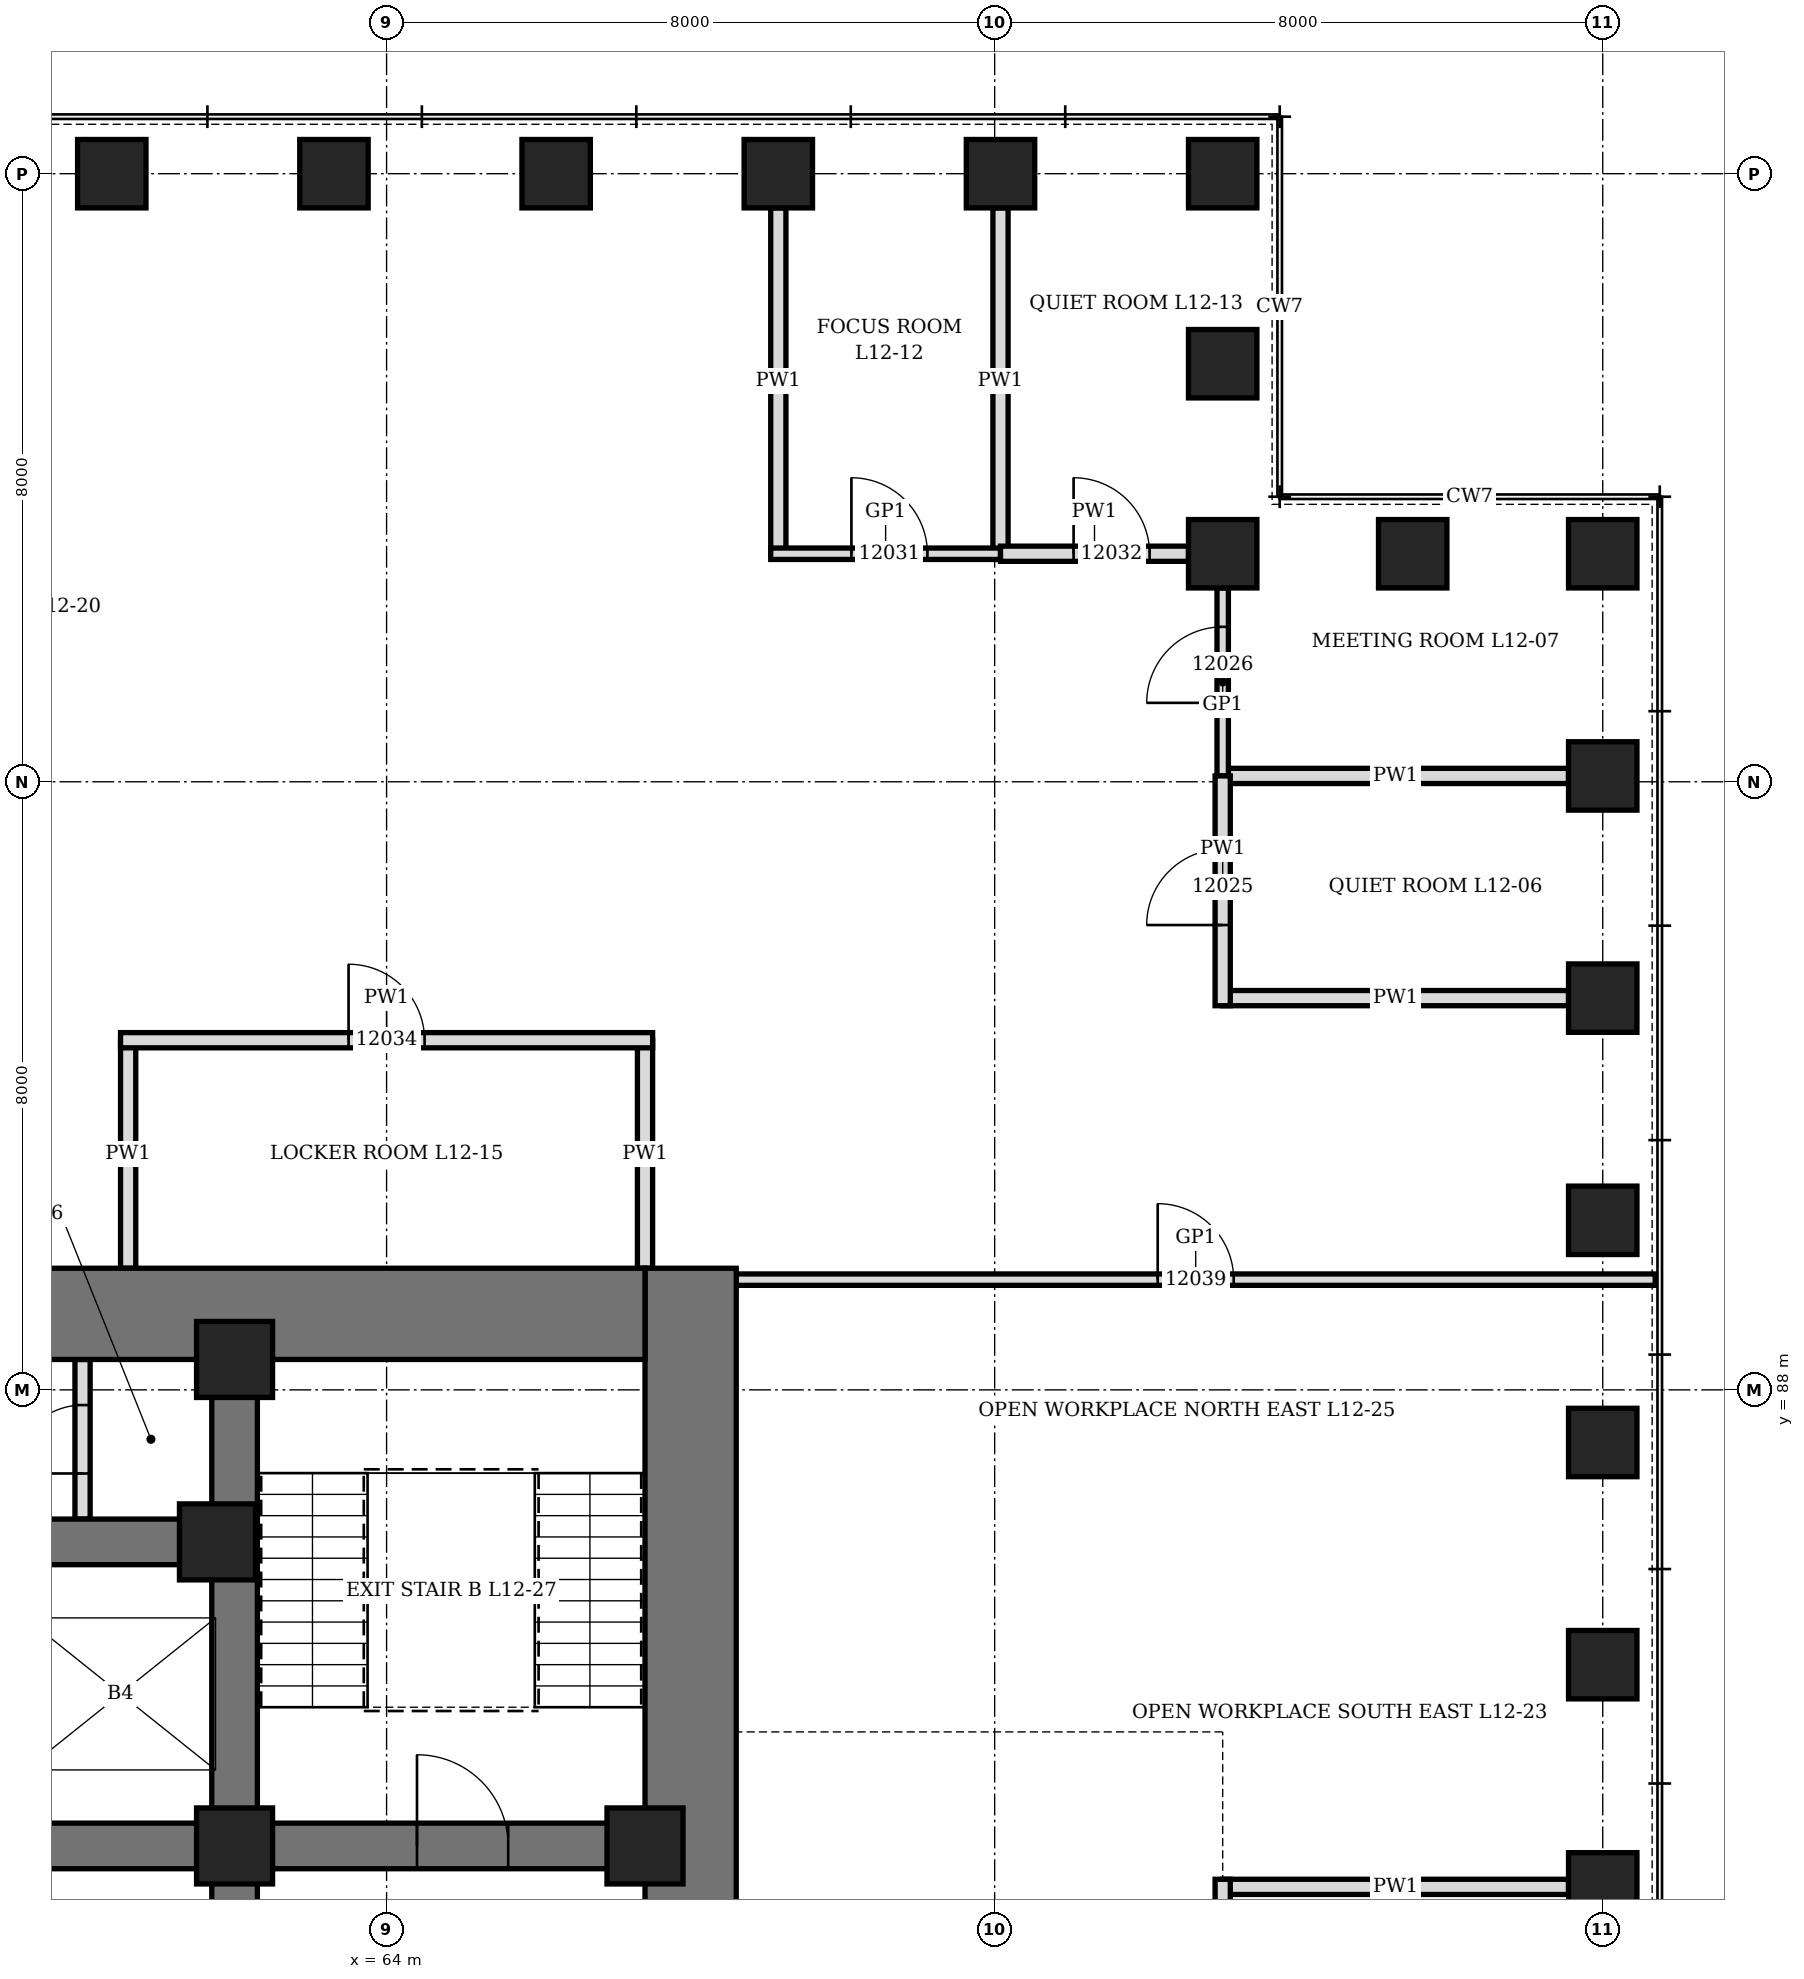
"""IFC4 building model, lengths in metres.
Left out: names, types, materials, properties, quantities, classifications, styles, units other than length and angle.
Written with IfcOpenShell. Run it as: python <this file> out.ifc"""

import sys

from ifc_helpers import new_model, si_unit, direction, frame, frame_2d, origin, origin_2d, place, context, subcontext, project, spatial, rectangle, hollow_rectangle, extrude, element, fill, save


model = new_model("IFC4")
c1 = context("Model", 3, precision=1e-05, world=origin(), true_north=direction((0.0, 1.0)))
c2 = subcontext(c1, "Body", "Model", "MODEL_VIEW")
j1 = project(units=[si_unit("LENGTHUNIT", "METRE"), si_unit("PLANEANGLEUNIT", "RADIAN")], contexts=[c1])
p1 = place(None, origin())
s1 = spatial("IfcSite", under=j1, at=p1, CompositionType="ELEMENT")
p2 = place(p1, origin())
s2 = spatial("IfcBuilding", under=s1, at=p2, CompositionType="ELEMENT")
p3 = place(p2, frame((0.0, 0.0, 60.1)))
s3 = spatial("IfcBuildingStorey", under=s2, at=p3, CompositionType="ELEMENT", Elevation=60.1)
for number, where, z_axis, x_axis in (
    (1, (80.0, 81.461, 0.0), (0.0, 0.0, 1.0), (0.0, 1.0, 0.0)),
    (2, (80.0, 84.385, 0.0), (0.0, 0.0, 1.0), (0.0, 1.0, 0.0)),
    (3, (80.0, 87.308, 0.0), (0.0, 0.0, 1.0), (0.0, 1.0, 0.0)),
    (4, (80.0, 90.231, 0.0), (0.0, 0.0, 1.0), (0.0, 1.0, 0.0)),
    (5, (80.0, 93.154, 0.0), (0.0, 0.0, 1.0), (0.0, 1.0, 0.0)),
    (6, (80.0, 96.077, 0.0), (0.0, 0.0, 1.0), (0.0, 1.0, 0.0)),
    (7, (80.0, 99.0, 0.0), (0.0, 0.0, 1.0), (1.0, 0.0, 0.0)),
    (8, (77.5, 99.0, 0.0), (0.0, 0.0, 1.0), (1.0, 0.0, 0.0)),
    (9, (75.0, 99.0, 0.0), (0.0, 0.0, 1.0), (0.0, 1.0, 0.0)),
    (10, (75.0, 101.5, 0.0), (0.0, 0.0, 1.0), (0.0, 1.0, 0.0)),
    (11, (75.0, 104.0, 0.0), (0.0, 0.0, 1.0), (1.0, 0.0, 0.0)),
    (12, (72.077, 104.0, 0.0), (0.0, 0.0, 1.0), (1.0, 0.0, 0.0)),
    (13, (69.154, 104.0, 0.0), (0.0, 0.0, 1.0), (1.0, 0.0, 0.0)),
    (14, (66.231, 104.0, 0.0), (0.0, 0.0, 1.0), (1.0, 0.0, 0.0)),
    (15, (63.308, 104.0, 0.0), (0.0, 0.0, 1.0), (1.0, 0.0, 0.0)),
    (16, (60.385, 104.0, 0.0), (0.0, 0.0, 1.0), (1.0, 0.0, 0.0)),
):
    element("IfcColumn", number, at=place(p3, frame(where, z_axis=z_axis, x_axis=x_axis)), inside=s3, PredefinedType="COLUMN", context=c2, shape_type="SweptSolid", body=[
        extrude(hollow_rectangle(XDim=0.9, YDim=0.9, WallThickness=0.12, at=origin_2d()), origin(), (0.0, 0.0, 1.0), 4.2),
    ])
p4 = place(p3, frame((68.0, 70.4, 0.0), z_axis=(0.0, 0.0, 1.0), x_axis=(0.0, 1.0, 0.0)))
e17 = element("IfcWall", 17, at=p4, inside=s3, PredefinedType="SHEAR", context=c2, shape_type="SweptSolid", body=[
    extrude(rectangle(XDim=19.2, YDim=1.2, at=frame_2d((9.6, 0.0))), origin(), (0.0, 0.0, 1.0), 4.2),
])
p5 = place(p4, frame((8.6, 0.0, 0.0)))
e18 = element("IfcOpeningElement", 18, at=p5, cuts=e17, PredefinedType="OPENING", context=c2, shape_type="SweptSolid", body=[
    extrude(rectangle(XDim=2.0, YDim=2.4, at=frame_2d((1.0, 1.2))), frame((0.0, 0.61, 0.0), z_axis=(0.0, -1.0, 0.0), x_axis=(1.0, 0.0, 0.0)), (0.0, 0.0, 1.0), 1.22),
])
p6 = place(p3, frame((44.6, 89.0, 0.0), z_axis=(0.0, 0.0, 1.0), x_axis=(1.0, 0.0, 0.0)))
e19 = element("IfcWall", 19, at=p6, inside=s3, PredefinedType="SHEAR", context=c2, shape_type="SweptSolid", body=[
    extrude(rectangle(XDim=22.8, YDim=1.2, at=frame_2d((11.4, 0.0))), origin(), (0.0, 0.0, 1.0), 4.2),
])
p7 = place(p6, frame((7.9, 0.0, 0.0)))
e20 = element("IfcOpeningElement", 20, at=p7, cuts=e19, PredefinedType="OPENING", context=c2, shape_type="SweptSolid", body=[
    extrude(rectangle(XDim=1.0, YDim=2.1, at=frame_2d((0.5, 1.05))), frame((0.0, 0.61, 0.0), z_axis=(0.0, -1.0, 0.0), x_axis=(1.0, 0.0, 0.0)), (0.0, 0.0, 1.0), 1.22),
])
p8 = place(p6, frame((13.05, 0.0, 0.0)))
e21 = element("IfcOpeningElement", 21, at=p8, cuts=e19, PredefinedType="OPENING", context=c2, shape_type="SweptSolid", body=[
    extrude(rectangle(XDim=0.9, YDim=2.1, at=frame_2d((0.45, 1.05))), frame((0.0, 0.61, 0.0), z_axis=(0.0, -1.0, 0.0), x_axis=(1.0, 0.0, 0.0)), (0.0, 0.0, 1.0), 1.22),
])
p9 = place(p3, frame((62.0, 71.6, 0.0), z_axis=(0.0, 0.0, 1.0), x_axis=(0.0, 1.0, 0.0)))
e22 = element("IfcWall", 22, at=p9, inside=s3, PredefinedType="SHEAR", context=c2, shape_type="SweptSolid", body=[
    extrude(rectangle(XDim=16.8, YDim=0.6, at=frame_2d((8.4, 0.0))), origin(), (0.0, 0.0, 1.0), 4.2),
])
p10 = place(p9, frame((7.5, 0.0, 0.0)))
e23 = element("IfcOpeningElement", 23, at=p10, cuts=e22, PredefinedType="OPENING", context=c2, shape_type="SweptSolid", body=[
    extrude(rectangle(XDim=1.8, YDim=2.4, at=frame_2d((0.9, 1.2))), frame((0.0, 0.31, 0.0), z_axis=(0.0, -1.0, 0.0), x_axis=(1.0, 0.0, 0.0)), (0.0, 0.0, 1.0), 0.62),
])
p11 = place(p3, frame((62.3, 82.0, 0.0), z_axis=(0.0, 0.0, 1.0), x_axis=(1.0, 0.0, 0.0)))
e24 = element("IfcWall", 24, at=p11, inside=s3, PredefinedType="SHEAR", context=c2, shape_type="SweptSolid", body=[
    extrude(rectangle(XDim=5.1, YDim=0.6, at=frame_2d((2.55, 0.0))), origin(), (0.0, 0.0, 1.0), 4.2),
])
p12 = place(p11, frame((2.1, 0.0, 0.0)))
e25 = element("IfcOpeningElement", 25, at=p12, cuts=e24, PredefinedType="OPENING", context=c2, shape_type="SweptSolid", body=[
    extrude(rectangle(XDim=1.2, YDim=2.1, at=frame_2d((0.6, 1.05))), frame((0.0, 0.31, 0.0), z_axis=(0.0, -1.0, 0.0), x_axis=(1.0, 0.0, 0.0)), (0.0, 0.0, 1.0), 0.62),
])
for number, where, z_axis, x_axis in (
    (26, (50.3, 82.0, 0.0), (0.0, 0.0, 1.0), (1.0, 0.0, 0.0)),
    (27, (50.3, 86.0, 0.0), (0.0, 0.0, 1.0), (1.0, 0.0, 0.0)),
):
    element("IfcWall", number, at=place(p3, frame(where, z_axis=z_axis, x_axis=x_axis)), inside=s3, PredefinedType="SHEAR", context=c2, shape_type="SweptSolid", body=[
        extrude(rectangle(XDim=11.4, YDim=0.6, at=frame_2d((5.7, 0.0))), origin(), (0.0, 0.0, 1.0), 4.2),
    ])
for number, where, z_axis, x_axis in (
    (28, (61.775, 86.0, 0.0), (0.0, 0.0, 1.0), (1.0, 0.0, 0.0)),
    (29, (62.0, 82.0, 0.0), (0.0, 0.0, 1.0), (1.0, 0.0, 0.0)),
    (30, (62.0, 88.4, 0.0), (0.0, 0.0, 1.0), (1.0, 0.0, 0.0)),
    (31, (67.4, 82.0, 0.0), (0.0, 0.0, 1.0), (1.0, 0.0, 0.0)),
):
    element("IfcColumn", number, at=place(p3, frame(where, z_axis=z_axis, x_axis=x_axis)), inside=s3, PredefinedType="COLUMN", context=c2, shape_type="SweptSolid", body=[
        extrude(hollow_rectangle(XDim=1.0, YDim=1.0, WallThickness=0.15, at=origin_2d()), origin(), (0.0, 0.0, 1.0), 4.2),
    ])
p13 = place(p3, frame((60.0, 86.3, 0.0), z_axis=(0.0, 0.0, 1.0), x_axis=(0.0, 1.0, 0.0)))
e32 = element("IfcWall", 32, at=p13, inside=s3, PredefinedType="PARTITIONING", context=c2, shape_type="SweptSolid", body=[
    extrude(rectangle(XDim=2.1, YDim=0.2, at=frame_2d((1.05, 0.0))), origin(), (0.0, 0.0, 1.0), 4.04),
])
p14 = place(p13, frame((0.6, 0.0, 0.0)))
e33 = element("IfcOpeningElement", 33, at=p14, cuts=e32, PredefinedType="OPENING", context=c2, shape_type="SweptSolid", body=[
    extrude(rectangle(XDim=0.9, YDim=2.1, at=frame_2d((0.45, 1.05))), frame((0.0, 0.11, 0.0), z_axis=(0.0, -1.0, 0.0), x_axis=(1.0, 0.0, 0.0)), (0.0, 0.0, 1.0), 0.22),
])
for number, where, z_axis, x_axis in (
    (34, (75.0, 81.461, 0.0), (0.0, 0.0, 1.0), (1.0, 0.0, 0.0)),
    (35, (75.0, 93.154, 0.0), (0.0, 0.0, 1.0), (1.0, 0.0, 0.0)),
    (36, (75.0, 96.077, 0.0), (0.0, 0.0, 1.0), (1.0, 0.0, 0.0)),
):
    element("IfcWall", number, at=place(p3, frame(where, z_axis=z_axis, x_axis=x_axis)), inside=s3, PredefinedType="PARTITIONING", context=c2, shape_type="SweptSolid", body=[
        extrude(rectangle(XDim=4.55, YDim=0.2, at=frame_2d((2.275, 0.0))), origin(), (0.0, 0.0, 1.0), 3.428),
    ])
p15 = place(p3, frame((69.154, 99.0, 0.0), z_axis=(0.0, 0.0, 1.0), x_axis=(0.0, 1.0, 0.0)))
e37 = element("IfcWall", 37, at=p15, inside=s3, PredefinedType="PARTITIONING", context=c2, shape_type="SweptSolid", body=[
    extrude(rectangle(XDim=4.55, YDim=0.2, at=frame_2d((2.275, 0.0))), origin(), (0.0, 0.0, 1.0), 3.278),
])
p16 = place(p3, frame((72.077, 99.0, 0.0), z_axis=(0.0, 0.0, 1.0), x_axis=(0.0, 1.0, 0.0)))
e38 = element("IfcWall", 38, at=p16, inside=s3, PredefinedType="PARTITIONING", context=c2, shape_type="SweptSolid", body=[
    extrude(rectangle(XDim=4.55, YDim=0.2, at=frame_2d((2.275, 0.0))), origin(), (0.0, 0.0, 1.0), 3.428),
])
for number, where, z_axis, x_axis in (
    (39, (60.6, 89.6, 0.0), (0.0, 0.0, 1.0), (0.0, 1.0, 0.0)),
    (40, (67.4, 89.6, 0.0), (0.0, 0.0, 1.0), (0.0, 1.0, 0.0)),
):
    element("IfcWall", number, at=place(p3, frame(where, z_axis=z_axis, x_axis=x_axis)), inside=s3, PredefinedType="PARTITIONING", context=c2, shape_type="SweptSolid", body=[
        extrude(rectangle(XDim=3.0, YDim=0.2, at=frame_2d((1.5, 0.0))), origin(), (0.0, 0.0, 1.0), 4.04),
    ])
p17 = place(p3, frame((68.6, 89.45, 0.0), z_axis=(0.0, 0.0, 1.0), x_axis=(1.0, 0.0, 0.0)))
e41 = element("IfcWall", 41, at=p17, inside=s3, PredefinedType="PARTITIONING", context=c2, shape_type="SweptSolid", body=[
    extrude(rectangle(XDim=12.09, YDim=0.15, at=frame_2d((6.045, 0.0))), origin(), (0.0, 0.0, 1.0), 4.04),
])
p18 = place(p17, frame((5.545, 0.0, 0.0)))
e42 = element("IfcOpeningElement", 42, at=p18, cuts=e41, PredefinedType="OPENING", context=c2, shape_type="SweptSolid", body=[
    extrude(rectangle(XDim=1.0, YDim=2.4, at=frame_2d((0.5, 1.2))), frame((0.0, 0.085, 0.0), z_axis=(0.0, -1.0, 0.0), x_axis=(1.0, 0.0, 0.0)), (0.0, 0.0, 1.0), 0.17),
])
p19 = place(p3, frame((60.5, 92.6, 0.0), z_axis=(0.0, 0.0, 1.0), x_axis=(1.0, 0.0, 0.0)))
e43 = element("IfcWall", 43, at=p19, inside=s3, PredefinedType="PARTITIONING", context=c2, shape_type="SweptSolid", body=[
    extrude(rectangle(XDim=7.0, YDim=0.2, at=frame_2d((3.5, 0.0))), origin(), (0.0, 0.0, 1.0), 4.04),
])
p20 = place(p19, frame((3.0, 0.0, 0.0)))
e44 = element("IfcOpeningElement", 44, at=p20, cuts=e43, PredefinedType="OPENING", context=c2, shape_type="SweptSolid", body=[
    extrude(rectangle(XDim=1.0, YDim=2.1, at=frame_2d((0.5, 1.05))), frame((0.0, 0.11, 0.0), z_axis=(0.0, -1.0, 0.0), x_axis=(1.0, 0.0, 0.0)), (0.0, 0.0, 1.0), 0.22),
])
p21 = place(p3, frame((69.054, 99.0, 0.0), z_axis=(0.0, 0.0, 1.0), x_axis=(1.0, 0.0, 0.0)))
e45 = element("IfcWall", 45, at=p21, inside=s3, PredefinedType="PARTITIONING", context=c2, shape_type="SweptSolid", body=[
    extrude(rectangle(XDim=3.023, YDim=0.15, at=frame_2d((1.511, 0.0))), origin(), (0.0, 0.0, 1.0), 4.04),
])
p22 = place(p21, frame((1.062, 0.0, 0.0)))
e46 = element("IfcOpeningElement", 46, at=p22, cuts=e45, PredefinedType="OPENING", context=c2, shape_type="SweptSolid", body=[
    extrude(rectangle(XDim=1.0, YDim=2.4, at=frame_2d((0.5, 1.2))), frame((0.0, 0.085, 0.0), z_axis=(0.0, -1.0, 0.0), x_axis=(1.0, 0.0, 0.0)), (0.0, 0.0, 1.0), 0.17),
])
p23 = place(p3, frame((72.077, 99.0, 0.0), z_axis=(0.0, 0.0, 1.0), x_axis=(1.0, 0.0, 0.0)))
e47 = element("IfcWall", 47, at=p23, inside=s3, PredefinedType="PARTITIONING", context=c2, shape_type="SweptSolid", body=[
    extrude(rectangle(XDim=2.473, YDim=0.2, at=frame_2d((1.237, 0.0))), origin(), (0.0, 0.0, 1.0), 4.04),
])
p24 = place(p23, frame((0.961, 0.0, 0.0)))
e48 = element("IfcOpeningElement", 48, at=p24, cuts=e47, PredefinedType="OPENING", context=c2, shape_type="SweptSolid", body=[
    extrude(rectangle(XDim=1.0, YDim=2.1, at=frame_2d((0.5, 1.05))), frame((0.0, 0.11, 0.0), z_axis=(0.0, -1.0, 0.0), x_axis=(1.0, 0.0, 0.0)), (0.0, 0.0, 1.0), 0.22),
])
p25 = place(p3, frame((75.0, 96.077, 0.0), z_axis=(0.0, 0.0, 1.0), x_axis=(0.0, 1.0, 0.0)))
e49 = element("IfcWall", 49, at=p25, inside=s3, PredefinedType="PARTITIONING", context=c2, shape_type="SweptSolid", body=[
    extrude(rectangle(XDim=2.473, YDim=0.15, at=frame_2d((1.237, 0.0))), origin(), (0.0, 0.0, 1.0), 4.04),
])
p26 = place(p25, frame((0.961, 0.0, 0.0)))
e50 = element("IfcOpeningElement", 50, at=p26, cuts=e49, PredefinedType="OPENING", context=c2, shape_type="SweptSolid", body=[
    extrude(rectangle(XDim=1.0, YDim=2.4, at=frame_2d((0.5, 1.2))), frame((0.0, 0.085, 0.0), z_axis=(0.0, -1.0, 0.0), x_axis=(1.0, 0.0, 0.0)), (0.0, 0.0, 1.0), 0.17),
])
p27 = place(p3, frame((75.0, 78.539, 0.0), z_axis=(0.0, 0.0, 1.0), x_axis=(0.0, 1.0, 0.0)))
e51 = element("IfcWall", 51, at=p27, inside=s3, PredefinedType="PARTITIONING", context=c2, shape_type="SweptSolid", body=[
    extrude(rectangle(XDim=3.023, YDim=0.2, at=frame_2d((1.511, 0.0))), origin(), (0.0, 0.0, 1.0), 4.04),
])
p28 = place(p27, frame((0.961, 0.0, 0.0)))
e52 = element("IfcOpeningElement", 52, at=p28, cuts=e51, PredefinedType="OPENING", context=c2, shape_type="SweptSolid", body=[
    extrude(rectangle(XDim=1.0, YDim=2.1, at=frame_2d((0.5, 1.05))), frame((0.0, 0.11, 0.0), z_axis=(0.0, -1.0, 0.0), x_axis=(1.0, 0.0, 0.0)), (0.0, 0.0, 1.0), 0.22),
])
p29 = place(p3, frame((75.0, 93.054, 0.0), z_axis=(0.0, 0.0, 1.0), x_axis=(0.0, 1.0, 0.0)))
e53 = element("IfcWall", 53, at=p29, inside=s3, PredefinedType="PARTITIONING", context=c2, shape_type="SweptSolid", body=[
    extrude(rectangle(XDim=3.023, YDim=0.2, at=frame_2d((1.511, 0.0))), origin(), (0.0, 0.0, 1.0), 4.04),
])
p30 = place(p29, frame((1.062, 0.0, 0.0)))
e54 = element("IfcOpeningElement", 54, at=p30, cuts=e53, PredefinedType="OPENING", context=c2, shape_type="SweptSolid", body=[
    extrude(rectangle(XDim=1.0, YDim=2.1, at=frame_2d((0.5, 1.05))), frame((0.0, 0.11, 0.0), z_axis=(0.0, -1.0, 0.0), x_axis=(1.0, 0.0, 0.0)), (0.0, 0.0, 1.0), 0.22),
])
p31 = place(p14, origin())
e55 = element("IfcDoor", 55, at=p31, inside=s3, OperationType="SINGLE_SWING_LEFT", PredefinedType="DOOR", context=c2, shape_type="SweptSolid", body=[
    extrude(rectangle(XDim=0.9, YDim=2.1, at=frame_2d((0.45, 1.05))), frame((0.0, 0.1, 0.0), z_axis=(0.0, -1.0, 0.0), x_axis=(1.0, 0.0, 0.0)), (0.0, 0.0, 1.0), 0.199),
])
fill(e33, e55)
p32 = place(p12, origin())
e56 = element("IfcDoor", 56, at=p32, inside=s3, OperationType="SINGLE_SWING_LEFT", PredefinedType="DOOR", context=c2, shape_type="SweptSolid", body=[
    extrude(rectangle(XDim=1.2, YDim=2.1, at=frame_2d((0.6, 1.05))), frame((0.0, 0.3, 0.0), z_axis=(0.0, -1.0, 0.0), x_axis=(1.0, 0.0, 0.0)), (0.0, 0.0, 1.0), 0.6),
])
fill(e25, e56)
p33 = place(p30, origin())
e57 = element("IfcDoor", 57, at=p33, inside=s3, OperationType="SINGLE_SWING_LEFT", PredefinedType="DOOR", context=c2, shape_type="SweptSolid", body=[
    extrude(rectangle(XDim=1.0, YDim=2.1, at=frame_2d((0.5, 1.05))), frame((0.0, 0.1, 0.0), z_axis=(0.0, -1.0, 0.0), x_axis=(1.0, 0.0, 0.0)), (0.0, 0.0, 1.0), 0.199),
])
fill(e54, e57)
p34 = place(p26, origin())
e58 = element("IfcDoor", 58, at=p34, inside=s3, OperationType="SINGLE_SWING_RIGHT", PredefinedType="DOOR", context=c2, shape_type="SweptSolid", body=[
    extrude(rectangle(XDim=1.0, YDim=2.4, at=frame_2d((0.5, 1.2))), frame((0.0, 0.075, 0.0), z_axis=(0.0, -1.0, 0.0), x_axis=(1.0, 0.0, 0.0)), (0.0, 0.0, 1.0), 0.149),
])
fill(e50, e58)
p35 = place(p22, origin())
e59 = element("IfcDoor", 59, at=p35, inside=s3, OperationType="SINGLE_SWING_RIGHT", PredefinedType="DOOR", context=c2, shape_type="SweptSolid", body=[
    extrude(rectangle(XDim=1.0, YDim=2.4, at=frame_2d((0.5, 1.2))), frame((0.0, 0.075, 0.0), z_axis=(0.0, -1.0, 0.0), x_axis=(1.0, 0.0, 0.0)), (0.0, 0.0, 1.0), 0.149),
])
fill(e46, e59)
p36 = place(p24, origin())
e60 = element("IfcDoor", 60, at=p36, inside=s3, OperationType="SINGLE_SWING_LEFT", PredefinedType="DOOR", context=c2, shape_type="SweptSolid", body=[
    extrude(rectangle(XDim=1.0, YDim=2.1, at=frame_2d((0.5, 1.05))), frame((0.0, 0.1, 0.0), z_axis=(0.0, -1.0, 0.0), x_axis=(1.0, 0.0, 0.0)), (0.0, 0.0, 1.0), 0.199),
])
fill(e48, e60)
p37 = place(p20, origin())
e61 = element("IfcDoor", 61, at=p37, inside=s3, OperationType="SINGLE_SWING_LEFT", PredefinedType="DOOR", context=c2, shape_type="SweptSolid", body=[
    extrude(rectangle(XDim=1.0, YDim=2.1, at=frame_2d((0.5, 1.05))), frame((0.0, 0.1, 0.0), z_axis=(0.0, -1.0, 0.0), x_axis=(1.0, 0.0, 0.0)), (0.0, 0.0, 1.0), 0.199),
])
fill(e44, e61)
p38 = place(p18, origin())
e62 = element("IfcDoor", 62, at=p38, inside=s3, OperationType="SINGLE_SWING_RIGHT", PredefinedType="DOOR", context=c2, shape_type="SweptSolid", body=[
    extrude(rectangle(XDim=1.0, YDim=2.4, at=frame_2d((0.5, 1.2))), frame((0.0, 0.075, 0.0), z_axis=(0.0, -1.0, 0.0), x_axis=(1.0, 0.0, 0.0)), (0.0, 0.0, 1.0), 0.149),
])
fill(e42, e62)
save(model, sys.argv[1])
